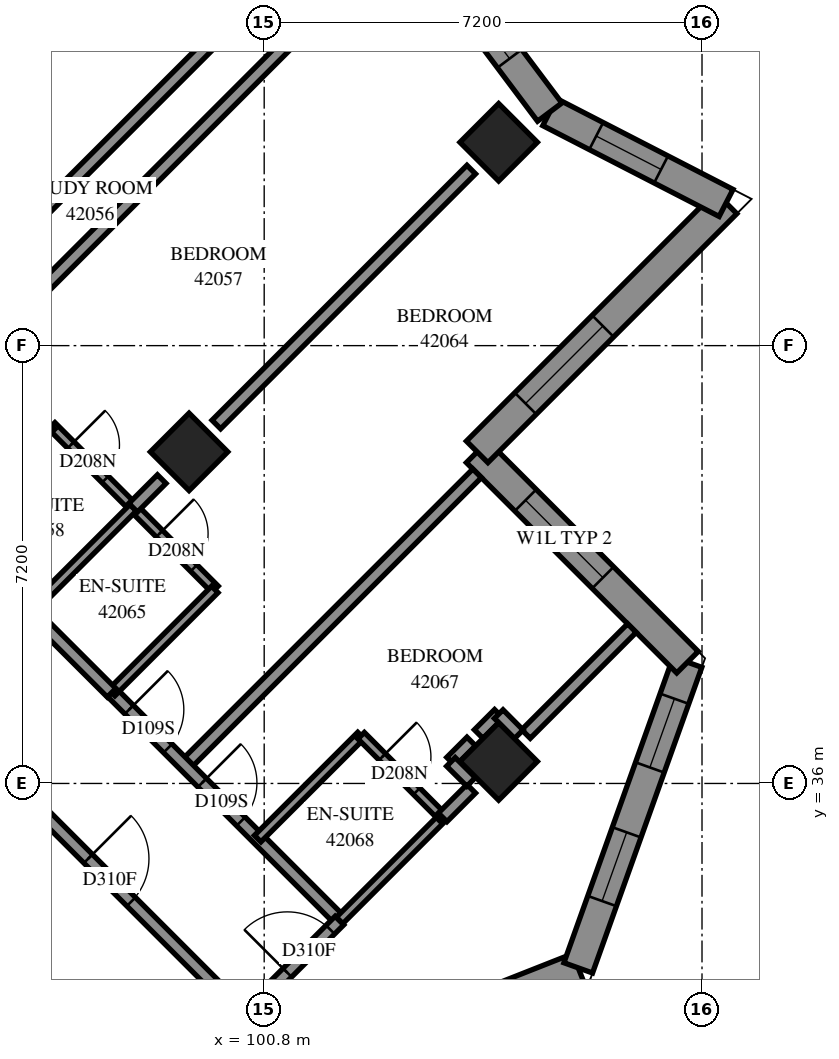
"""IFC4 building model, lengths in metres.
Left out: names, types, materials, properties, quantities, classifications, styles, units other than length and angle.
Written with IfcOpenShell. Run it as: python <this file> out.ifc"""

import sys

from ifc_helpers import new_model, si_unit, direction, frame, frame_2d, origin, origin_2d, place, context, subcontext, project, spatial, polyline, rectangle, outline, extrude, element, fill, save


model = new_model("IFC4")
c1 = context("Model", 3, precision=1e-05, world=origin(), true_north=direction((0.0, 1.0)))
c2 = subcontext(c1, "Body", "Model", "MODEL_VIEW")
j1 = project(units=[si_unit("LENGTHUNIT", "METRE"), si_unit("PLANEANGLEUNIT", "RADIAN")], contexts=[c1])
p1 = place(None, origin())
s1 = spatial("IfcSite", under=j1, at=p1, CompositionType="ELEMENT")
p2 = place(p1, origin())
s2 = spatial("IfcBuilding", under=s1, at=p2, CompositionType="ELEMENT")
p3 = place(p2, frame((0.0, 0.0, 155.8)))
s3 = spatial("IfcBuildingStorey", under=s2, at=p3, CompositionType="ELEMENT", Elevation=155.8)
for number, where, z_axis, x_axis in (
    (1, (104.656, 46.544, 0.0), (0.0, 0.0, 1.0), (0.707, -0.707, 0.0)),
    (2, (99.565, 41.453, 0.0), (0.0, 0.0, 1.0), (0.707, -0.707, 0.0)),
    (3, (104.656, 36.362, 0.0), (0.0, 0.0, 1.0), (0.707, -0.707, 0.0)),
):
    element("IfcColumn", number, at=place(p3, frame(where, z_axis=z_axis, x_axis=x_axis)), inside=s3, PredefinedType="COLUMN", context=c2, shape_type="SweptSolid", body=[
        extrude(rectangle(XDim=0.9, YDim=0.9, at=origin_2d()), origin(), (0.0, 0.0, 1.0), 3.1),
    ])
p4 = place(p3, frame((87.049, 38.695, -0.3), z_axis=(0.0, 0.0, 1.0), x_axis=(0.7071067812, 0.7071067812, 0.0)))
e4 = element("IfcWall", 4, at=p4, inside=s3, PredefinedType="SHEAR", context=c2, shape_type="SweptSolid", body=[
    extrude(rectangle(XDim=14.4, YDim=0.6, at=frame_2d((7.2, 0.0))), origin(), (0.0, 0.0, 1.0), 2.7),
])
p5 = place(p4, frame((4.55, 0.0, 0.3)))
e5 = element("IfcOpeningElement", 5, at=p5, cuts=e4, PredefinedType="OPENING", context=c2, shape_type="SweptSolid", body=[
    extrude(rectangle(XDim=1.1, YDim=2.1, at=frame_2d((0.55, 1.05))), frame((0.0, 0.31, 0.0), z_axis=(0.0, -1.0, 0.0), x_axis=(1.0, 0.0, 0.0)), (0.0, 0.0, 1.0), 0.62),
])
p6 = place(p4, frame((11.35, 0.0, 0.3)))
e6 = element("IfcOpeningElement", 6, at=p6, cuts=e4, PredefinedType="OPENING", context=c2, shape_type="SweptSolid", body=[
    extrude(rectangle(XDim=1.1, YDim=2.1, at=frame_2d((0.55, 1.05))), frame((0.0, 0.31, 0.0), z_axis=(0.0, -1.0, 0.0), x_axis=(1.0, 0.0, 0.0)), (0.0, 0.0, 1.0), 0.62),
])
p7 = place(p3, frame((100.828, 30.939, 0.0), z_axis=(0.0, 0.0, 1.0), x_axis=(0.930134551, 0.3672188953, 0.0)))
e7 = element("IfcWall", 7, at=p7, inside=s3, PredefinedType="SOLIDWALL", context=c2, shape_type="SweptSolid", body=[
    extrude(outline(polyline([(0.108, -0.25), (5.636, -0.25), (5.409, 0.25), (-0.108, 0.25), (0.108, -0.25)])), origin(), (0.0, 0.0, 1.0), 3.1),
])
p8 = place(p7, frame((0.62, 0.0, 0.45)))
e8 = element("IfcOpeningElement", 8, at=p8, cuts=e7, PredefinedType="OPENING", context=c2, shape_type="SweptSolid", body=[
    extrude(rectangle(XDim=2.8, YDim=2.5, at=frame_2d((1.4, 1.25))), frame((0.0, 0.26, 0.0), z_axis=(0.0, -1.0, 0.0), x_axis=(1.0, 0.0, 0.0)), (0.0, 0.0, 1.0), 0.52),
])
p9 = place(p3, frame((105.964, 32.967, 0.0), z_axis=(0.0, 0.0, 1.0), x_axis=(0.3366105096, 0.9416439693, 0.0)))
e9 = element("IfcWall", 9, at=p9, inside=s3, PredefinedType="SOLIDWALL", context=c2, shape_type="SweptSolid", body=[
    extrude(outline(polyline([(-0.113, -0.25), (5.497, -0.25), (5.18, 0.25), (0.113, 0.25), (-0.113, -0.25)])), origin(), (0.0, 0.0, 1.0), 3.1),
])
p10 = place(p9, frame((1.167, 0.0, 0.45)))
e10 = element("IfcOpeningElement", 10, at=p10, cuts=e9, PredefinedType="OPENING", context=c2, shape_type="SweptSolid", body=[
    extrude(rectangle(XDim=1.2, YDim=2.5, at=frame_2d((0.6, 1.25))), frame((0.0, 0.26, 0.0), z_axis=(0.0, -1.0, 0.0), x_axis=(1.0, 0.0, 0.0)), (0.0, 0.0, 1.0), 0.52),
])
p11 = place(p9, frame((3.5, 0.0, 0.45)))
e11 = element("IfcOpeningElement", 11, at=p11, cuts=e9, PredefinedType="OPENING", context=c2, shape_type="SweptSolid", body=[
    extrude(rectangle(XDim=1.2, YDim=2.5, at=frame_2d((0.6, 1.25))), frame((0.0, 0.26, 0.0), z_axis=(0.0, -1.0, 0.0), x_axis=(1.0, 0.0, 0.0)), (0.0, 0.0, 1.0), 0.52),
])
p12 = place(p3, frame((107.761, 37.994, 0.0), z_axis=(0.0, 0.0, 1.0), x_axis=(-0.7071170022, 0.70709656, 0.0)))
e12 = element("IfcWall", 12, at=p12, inside=s3, PredefinedType="SOLIDWALL", context=c2, shape_type="SweptSolid", body=[
    extrude(outline(polyline([(-0.158, -0.25), (4.642, -0.25), (5.142, 0.25), (0.158, 0.25), (-0.158, -0.25)])), origin(), (0.0, 0.0, 1.0), 3.1),
])
p13 = place(p12, frame((1.967, 0.0, 0.6)))
e13 = element("IfcOpeningElement", 13, at=p13, cuts=e12, PredefinedType="OPENING", context=c2, shape_type="SweptSolid", body=[
    extrude(rectangle(XDim=1.8, YDim=1.9, at=frame_2d((0.9, 0.95))), frame((0.0, 0.26, 0.0), z_axis=(0.0, -1.0, 0.0), x_axis=(1.0, 0.0, 0.0)), (0.0, 0.0, 1.0), 0.52),
])
p14 = place(p3, frame((104.302, 41.453, 0.0), z_axis=(0.0, 0.0, 1.0), x_axis=(0.7071240536, 0.7070895083, 0.0)))
e14 = element("IfcWall", 14, at=p14, inside=s3, PredefinedType="SOLIDWALL", context=c2, shape_type="SweptSolid", body=[
    extrude(outline(polyline([(0.25, -0.25), (6.132, -0.25), (5.447, 0.25), (-0.25, 0.25), (0.25, -0.25)])), origin(), (0.0, 0.0, 1.0), 3.1),
])
p15 = place(p14, frame((1.125, 0.0, 0.6)))
e15 = element("IfcOpeningElement", 15, at=p15, cuts=e14, PredefinedType="OPENING", context=c2, shape_type="SweptSolid", body=[
    extrude(rectangle(XDim=1.8, YDim=1.9, at=frame_2d((0.9, 0.95))), frame((0.0, 0.26, 0.0), z_axis=(0.0, -1.0, 0.0), x_axis=(1.0, 0.0, 0.0)), (0.0, 0.0, 1.0), 0.52),
])
p16 = place(p3, frame((108.396, 45.547, 0.0), z_axis=(0.0, 0.0, 1.0), x_axis=(-0.8890618858, 0.4577870282, 0.0)))
e16 = element("IfcWall", 16, at=p16, inside=s3, PredefinedType="SOLIDWALL", context=c2, shape_type="SweptSolid", body=[
    extrude(outline(polyline([(-0.343, -0.25), (3.205, -0.25), (3.32, 0.25), (0.343, 0.25), (-0.343, -0.25)])), origin(), (0.0, 0.0, 1.0), 3.1),
])
p17 = place(p16, frame((1.203, 0.0, 0.45)))
e17 = element("IfcOpeningElement", 17, at=p17, cuts=e16, PredefinedType="OPENING", context=c2, shape_type="SweptSolid", body=[
    extrude(rectangle(XDim=1.2, YDim=2.5, at=frame_2d((0.6, 1.25))), frame((0.0, 0.26, 0.0), z_axis=(0.0, -1.0, 0.0), x_axis=(1.0, 0.0, 0.0)), (0.0, 0.0, 1.0), 0.52),
])
p18 = place(p3, frame((105.495, 47.04, 0.0), z_axis=(0.0, 0.0, 1.0), x_axis=(-0.600158369, 0.7998811987, 0.0)))
e18 = element("IfcWall", 18, at=p18, inside=s3, PredefinedType="SOLIDWALL", context=c2, shape_type="SweptSolid", body=[
    extrude(outline(polyline([(0.057, -0.25), (3.47, -0.25), (3.399, 0.25), (-0.057, 0.25), (0.057, -0.25)])), origin(), (0.0, 0.0, 1.0), 3.1),
])
p19 = place(p18, frame((1.099, 0.0, 0.45)))
e19 = element("IfcOpeningElement", 19, at=p19, cuts=e18, PredefinedType="OPENING", context=c2, shape_type="SweptSolid", body=[
    extrude(rectangle(XDim=1.2, YDim=2.5, at=frame_2d((0.6, 1.25))), frame((0.0, 0.26, 0.0), z_axis=(0.0, -1.0, 0.0), x_axis=(1.0, 0.0, 0.0)), (0.0, 0.0, 1.0), 0.52),
])
p20 = place(p3, frame((94.401, 41.383, 0.0), z_axis=(0.0, 0.0, 1.0), x_axis=(0.7071067812, 0.7071067812, 0.0)))
e20 = element("IfcWall", 20, at=p20, inside=s3, PredefinedType="PARTITIONING", context=c2, shape_type="SweptSolid", body=[
    extrude(rectangle(XDim=12.014, YDim=0.2, at=frame_2d((6.007, 0.0))), origin(), (0.0, 0.0, 1.0), 3.1),
])
p21 = place(p3, frame((92.209, 40.459, 0.0), z_axis=(0.0, 0.0, 1.0), x_axis=(0.7071067812, -0.7071067812, 0.0)))
e21 = element("IfcWall", 21, at=p21, inside=s3, PredefinedType="PARTITIONING", context=c2, shape_type="SweptSolid", body=[
    extrude(rectangle(XDim=11.698, YDim=0.2, at=frame_2d((5.849, 0.0))), origin(), (0.0, 0.0, 1.0), 3.1),
])
p22 = place(p21, frame((3.047, 0.0, 0.0)))
e22 = element("IfcOpeningElement", 22, at=p22, cuts=e21, PredefinedType="OPENING", context=c2, shape_type="SweptSolid", body=[
    extrude(rectangle(XDim=0.9, YDim=2.1, at=frame_2d((0.45, 1.05))), frame((0.0, 0.11, 0.0), z_axis=(0.0, -1.0, 0.0), x_axis=(1.0, 0.0, 0.0)), (0.0, 0.0, 1.0), 0.22),
])
p23 = place(p21, frame((8.056, 0.0, 0.0)))
e23 = element("IfcOpeningElement", 23, at=p23, cuts=e21, PredefinedType="OPENING", context=c2, shape_type="SweptSolid", body=[
    extrude(rectangle(XDim=1.0, YDim=2.1, at=frame_2d((0.5, 1.05))), frame((0.0, 0.11, 0.0), z_axis=(0.0, -1.0, 0.0), x_axis=(1.0, 0.0, 0.0)), (0.0, 0.0, 1.0), 0.22),
])
p24 = place(p3, frame((93.767, 42.021, 0.0), z_axis=(0.0, 0.0, 1.0), x_axis=(0.7071067812, 0.7071067812, 0.0)))
e24 = element("IfcWall", 24, at=p24, inside=s3, PredefinedType="PARTITIONING", context=c2, shape_type="SweptSolid", body=[
    extrude(rectangle(XDim=9.998, YDim=0.2, at=frame_2d((4.999, 0.0))), origin(), (0.0, 0.0, 1.0), 3.1),
])
p25 = place(p24, frame((0.196, 0.0, 0.0)))
e25 = element("IfcOpeningElement", 25, at=p25, cuts=e24, PredefinedType="OPENING", context=c2, shape_type="SweptSolid", body=[
    extrude(rectangle(XDim=1.0, YDim=2.1, at=frame_2d((0.5, 1.05))), frame((0.0, 0.11, 0.0), z_axis=(0.0, -1.0, 0.0), x_axis=(1.0, 0.0, 0.0)), (0.0, 0.0, 1.0), 0.22),
])
p26 = place(p3, frame((99.494, 36.292, 0.0), z_axis=(0.0, 0.0, 1.0), x_axis=(0.7071067812, 0.7071067812, 0.0)))
e26 = element("IfcWall", 26, at=p26, inside=s3, PredefinedType="PARTITIONING", context=c2, shape_type="SweptSolid", body=[
    extrude(rectangle(XDim=6.799, YDim=0.2, at=frame_2d((3.4, 0.0))), origin(), (0.0, 0.0, 1.0), 3.1),
])
p27 = place(p3, frame((100.013, 41.903, 0.0), z_axis=(0.0, 0.0, 1.0), x_axis=(0.7071067812, 0.7071067812, 0.0)))
e27 = element("IfcWall", 27, at=p27, inside=s3, PredefinedType="PARTITIONING", context=c2, shape_type="SweptSolid", body=[
    extrude(rectangle(XDim=5.928, YDim=0.2, at=frame_2d((2.964, 0.0))), origin(), (0.0, 0.0, 1.0), 3.1),
])
p28 = place(p3, frame((98.295, 37.497, 0.0), z_axis=(0.0, 0.0, 1.0), x_axis=(0.7071067812, -0.7071067812, 0.0)))
e28 = element("IfcWall", 28, at=p28, inside=s3, PredefinedType="PARTITIONING", context=c2, shape_type="SweptSolid", body=[
    extrude(rectangle(XDim=5.301, YDim=0.2, at=frame_2d((2.65, 0.0))), origin(), (0.0, 0.0, 1.0), 3.1),
])
p29 = place(p28, frame((0.401, 0.0, 0.0)))
e29 = element("IfcOpeningElement", 29, at=p29, cuts=e28, PredefinedType="OPENING", context=c2, shape_type="SweptSolid", body=[
    extrude(rectangle(XDim=0.9, YDim=2.1, at=frame_2d((0.45, 1.05))), frame((0.0, 0.11, 0.0), z_axis=(0.0, -1.0, 0.0), x_axis=(1.0, 0.0, 0.0)), (0.0, 0.0, 1.0), 0.22),
])
p30 = place(p28, frame((2.1, 0.0, 0.0)))
e30 = element("IfcOpeningElement", 30, at=p30, cuts=e28, PredefinedType="OPENING", context=c2, shape_type="SweptSolid", body=[
    extrude(rectangle(XDim=0.9, YDim=2.1, at=frame_2d((0.45, 1.05))), frame((0.0, 0.11, 0.0), z_axis=(0.0, -1.0, 0.0), x_axis=(1.0, 0.0, 0.0)), (0.0, 0.0, 1.0), 0.22),
])
p31 = place(p3, frame((97.305, 41.881, 0.0), z_axis=(0.0, 0.0, 1.0), x_axis=(0.7067382634, -0.707475107, 0.0)))
e31 = element("IfcWall", 31, at=p31, inside=s3, PredefinedType="PARTITIONING", context=c2, shape_type="SweptSolid", body=[
    extrude(rectangle(XDim=3.8, YDim=0.15, at=frame_2d((1.9, 0.0))), origin(), (0.0, 0.0, 1.0), 3.1),
])
p32 = place(p31, frame((0.445, 0.0, 0.0)))
e32 = element("IfcOpeningElement", 32, at=p32, cuts=e31, PredefinedType="OPENING", context=c2, shape_type="SweptSolid", body=[
    extrude(rectangle(XDim=0.8, YDim=2.1, at=frame_2d((0.4, 1.05))), frame((0.0, 0.085, 0.0), z_axis=(0.0, -1.0, 0.0), x_axis=(1.0, 0.0, 0.0)), (0.0, 0.0, 1.0), 0.17),
])
p33 = place(p31, frame((2.507, 0.0, 0.0)))
e33 = element("IfcOpeningElement", 33, at=p33, cuts=e31, PredefinedType="OPENING", context=c2, shape_type="SweptSolid", body=[
    extrude(rectangle(XDim=0.8, YDim=2.1, at=frame_2d((0.4, 1.05))), frame((0.0, 0.085, 0.0), z_axis=(0.0, -1.0, 0.0), x_axis=(1.0, 0.0, 0.0)), (0.0, 0.0, 1.0), 0.17),
])
p34 = place(p3, frame((105.105, 36.813, 0.0), z_axis=(0.0, 0.0, 1.0), x_axis=(0.7071067812, 0.7071067812, 0.0)))
e34 = element("IfcWall", 34, at=p34, inside=s3, PredefinedType="PARTITIONING", context=c2, shape_type="SweptSolid", body=[
    extrude(rectangle(XDim=2.463, YDim=0.2, at=frame_2d((1.232, 0.0))), origin(), (0.0, 0.0, 1.0), 3.1),
])
for number, where, z_axis, x_axis in (
    (35, (95.603, 40.181, 0.0), (0.0, 0.0, 1.0), (0.707, 0.707, 0.0)),
    (36, (96.947, 38.837, 0.0), (0.0, 0.0, 1.0), (0.707, 0.707, 0.0)),
):
    element("IfcWall", number, at=place(p3, frame(where, z_axis=z_axis, x_axis=x_axis)), inside=s3, PredefinedType="PARTITIONING", context=c2, shape_type="SweptSolid", body=[
        extrude(rectangle(XDim=2.401, YDim=0.15, at=frame_2d((1.201, 0.0))), origin(), (0.0, 0.0, 1.0), 3.1),
    ])
p35 = place(p3, frame((100.693, 35.093, 0.0), z_axis=(0.0, 0.0, 1.0), x_axis=(0.7075233388, 0.706689978, 0.0)))
e37 = element("IfcWall", 37, at=p35, inside=s3, PredefinedType="PARTITIONING", context=c2, shape_type="SweptSolid", body=[
    extrude(rectangle(XDim=2.4, YDim=0.15, at=frame_2d((1.2, 0.0))), origin(), (0.0, 0.0, 1.0), 3.1),
])
p36 = place(p3, frame((98.291, 37.495, 0.0), z_axis=(0.0, 0.0, 1.0), x_axis=(0.7071067812, 0.7071067812, 0.0)))
e38 = element("IfcWall", 38, at=p36, inside=s3, PredefinedType="PARTITIONING", context=c2, shape_type="SweptSolid", body=[
    extrude(rectangle(XDim=2.398, YDim=0.15, at=frame_2d((1.199, 0.0))), origin(), (0.0, 0.0, 1.0), 3.1),
])
p37 = place(p3, frame((102.039, 33.747, 0.0), z_axis=(0.0, 0.0, 1.0), x_axis=(0.7071067812, 0.7071067812, 0.0)))
e39 = element("IfcWall", 39, at=p37, inside=s3, PredefinedType="PARTITIONING", context=c2, shape_type="SweptSolid", body=[
    extrude(rectangle(XDim=2.398, YDim=0.15, at=frame_2d((1.199, 0.0))), origin(), (0.0, 0.0, 1.0), 2.6),
])
p38 = place(p3, frame((100.483, 32.191, 0.0), z_axis=(0.0, 0.0, 1.0), x_axis=(0.7071067812, 0.7071067812, 0.0)))
e40 = element("IfcWall", 40, at=p38, inside=s3, PredefinedType="PARTITIONING", context=c2, shape_type="SweptSolid", body=[
    extrude(rectangle(XDim=2.198, YDim=0.2, at=frame_2d((1.099, 0.0))), origin(), (0.0, 0.0, 1.0), 2.6),
])
p39 = place(p38, frame((0.987, 0.0, 0.0)))
e41 = element("IfcOpeningElement", 41, at=p39, cuts=e40, PredefinedType="OPENING", context=c2, shape_type="SweptSolid", body=[
    extrude(rectangle(XDim=1.0, YDim=2.1, at=frame_2d((0.5, 1.05))), frame((0.0, 0.11, 0.0), z_axis=(0.0, -1.0, 0.0), x_axis=(1.0, 0.0, 0.0)), (0.0, 0.0, 1.0), 0.22),
])
p40 = place(p3, frame((96.946, 38.834, 0.0), z_axis=(0.0, 0.0, 1.0), x_axis=(0.7076330979, -0.7065800724, 0.0)))
e42 = element("IfcWall", 42, at=p40, inside=s3, PredefinedType="PARTITIONING", context=c2, shape_type="SweptSolid", body=[
    extrude(rectangle(XDim=1.899, YDim=0.2, at=frame_2d((0.95, 0.0))), origin(), (0.0, 0.0, 1.0), 3.1),
])
p41 = place(p3, frame((102.394, 36.786, 0.0), z_axis=(0.0, 0.0, 1.0), x_axis=(0.7065800724, -0.7076330979, 0.0)))
e43 = element("IfcWall", 43, at=p41, inside=s3, PredefinedType="PARTITIONING", context=c2, shape_type="SweptSolid", body=[
    extrude(rectangle(XDim=1.899, YDim=0.15, at=frame_2d((0.95, 0.0))), origin(), (0.0, 0.0, 1.0), 3.1),
])
p42 = place(p41, frame((0.492, 0.0, 0.0)))
e44 = element("IfcOpeningElement", 44, at=p42, cuts=e43, PredefinedType="OPENING", context=c2, shape_type="SweptSolid", body=[
    extrude(rectangle(XDim=0.8, YDim=2.1, at=frame_2d((0.4, 1.05))), frame((0.0, 0.085, 0.0), z_axis=(0.0, -1.0, 0.0), x_axis=(1.0, 0.0, 0.0)), (0.0, 0.0, 1.0), 0.17),
])
p43 = place(p3, frame((98.645, 40.535, 0.0), z_axis=(0.0, 0.0, 1.0), x_axis=(0.7071067812, 0.7071067812, 0.0)))
e45 = element("IfcWall", 45, at=p43, inside=s3, PredefinedType="PARTITIONING", context=c2, shape_type="SweptSolid", body=[
    extrude(rectangle(XDim=0.665, YDim=0.2, at=frame_2d((0.332, 0.0))), origin(), (0.0, 0.0, 1.0), 3.1),
])
p44 = place(p3, frame((103.735, 35.443, 0.0), z_axis=(0.0, 0.0, 1.0), x_axis=(0.7071067812, 0.7071067812, 0.0)))
e46 = element("IfcWall", 46, at=p44, inside=s3, PredefinedType="PARTITIONING", context=c2, shape_type="SweptSolid", body=[
    extrude(rectangle(XDim=0.665, YDim=0.2, at=frame_2d((0.332, 0.0))), origin(), (0.0, 0.0, 1.0), 2.6),
])
for number, where, z_axis, x_axis in (
    (47, (103.873, 36.359, 0.0), (0.0, 0.0, 1.0), (0.707, 0.707, 0.0)),
    (48, (104.327, 36.813, 0.0), (0.0, 0.0, 1.0), (0.707, 0.707, 0.0)),
):
    element("IfcWall", number, at=place(p3, frame(where, z_axis=z_axis, x_axis=x_axis)), inside=s3, PredefinedType="PARTITIONING", context=c2, shape_type="SweptSolid", body=[
        extrude(rectangle(XDim=0.469, YDim=0.2, at=frame_2d((0.235, 0.0))), origin(), (0.0, 0.0, 1.0), 3.1),
    ])
for number, where, z_axis, x_axis in (
    (49, (103.871, 36.355, 0.0), (0.0, 0.0, 1.0), (0.709, -0.705, 0.0)),
    (50, (104.657, 37.141, 0.0), (0.0, 0.0, 1.0), (0.705, -0.709, 0.0)),
):
    element("IfcWall", number, at=place(p3, frame(where, z_axis=z_axis, x_axis=x_axis)), inside=s3, PredefinedType="PARTITIONING", context=c2, shape_type="SweptSolid", body=[
        extrude(rectangle(XDim=0.468, YDim=0.2, at=frame_2d((0.234, 0.0))), origin(), (0.0, 0.0, 1.0), 3.1),
    ])
p45 = place(p10, origin())
e51 = element("IfcWindow", 51, at=p45, inside=s3, PartitioningType="SINGLE_PANEL", PredefinedType="WINDOW", context=c2, shape_type="SweptSolid", body=[
    extrude(rectangle(XDim=1.2, YDim=2.5, at=frame_2d((0.6, 1.25))), frame((0.0, 0.18, 0.0), z_axis=(0.0, -1.0, 0.0), x_axis=(1.0, 0.0, 0.0)), (0.0, 0.0, 1.0), 0.06),
])
fill(e10, e51)
p46 = place(p11, origin())
e52 = element("IfcWindow", 52, at=p46, inside=s3, PartitioningType="SINGLE_PANEL", PredefinedType="WINDOW", context=c2, shape_type="SweptSolid", body=[
    extrude(rectangle(XDim=1.2, YDim=2.5, at=frame_2d((0.6, 1.25))), frame((0.0, 0.18, 0.0), z_axis=(0.0, -1.0, 0.0), x_axis=(1.0, 0.0, 0.0)), (0.0, 0.0, 1.0), 0.06),
])
fill(e11, e52)
p47 = place(p13, origin())
e53 = element("IfcWindow", 53, at=p47, inside=s3, PartitioningType="SINGLE_PANEL", PredefinedType="WINDOW", context=c2, shape_type="SweptSolid", body=[
    extrude(rectangle(XDim=1.8, YDim=1.9, at=frame_2d((0.9, 0.95))), frame((0.0, 0.18, 0.0), z_axis=(0.0, -1.0, 0.0), x_axis=(1.0, 0.0, 0.0)), (0.0, 0.0, 1.0), 0.06),
])
fill(e13, e53)
p48 = place(p15, origin())
e54 = element("IfcWindow", 54, at=p48, inside=s3, PartitioningType="SINGLE_PANEL", PredefinedType="WINDOW", context=c2, shape_type="SweptSolid", body=[
    extrude(rectangle(XDim=1.8, YDim=1.9, at=frame_2d((0.9, 0.95))), frame((0.0, 0.18, 0.0), z_axis=(0.0, -1.0, 0.0), x_axis=(1.0, 0.0, 0.0)), (0.0, 0.0, 1.0), 0.06),
])
fill(e15, e54)
p49 = place(p17, origin())
e55 = element("IfcWindow", 55, at=p49, inside=s3, PartitioningType="SINGLE_PANEL", PredefinedType="WINDOW", context=c2, shape_type="SweptSolid", body=[
    extrude(rectangle(XDim=1.2, YDim=2.5, at=frame_2d((0.6, 1.25))), frame((0.0, 0.18, 0.0), z_axis=(0.0, -1.0, 0.0), x_axis=(1.0, 0.0, 0.0)), (0.0, 0.0, 1.0), 0.06),
])
fill(e17, e55)
p50 = place(p19, origin())
e56 = element("IfcWindow", 56, at=p50, inside=s3, PartitioningType="SINGLE_PANEL", PredefinedType="WINDOW", context=c2, shape_type="SweptSolid", body=[
    extrude(rectangle(XDim=1.2, YDim=2.5, at=frame_2d((0.6, 1.25))), frame((0.0, 0.18, 0.0), z_axis=(0.0, -1.0, 0.0), x_axis=(1.0, 0.0, 0.0)), (0.0, 0.0, 1.0), 0.06),
])
fill(e19, e56)
p51 = place(p32, origin())
e57 = element("IfcDoor", 57, at=p51, inside=s3, OperationType="SINGLE_SWING_RIGHT", PredefinedType="DOOR", context=c2, shape_type="SweptSolid", body=[
    extrude(rectangle(XDim=0.8, YDim=2.1, at=frame_2d((0.4, 1.05))), frame((0.0, 0.025, 0.0), z_axis=(0.0, -1.0, 0.0), x_axis=(1.0, 0.0, 0.0)), (0.0, 0.0, 1.0), 0.05),
])
fill(e32, e57)
p52 = place(p29, origin())
e58 = element("IfcDoor", 58, at=p52, inside=s3, OperationType="SINGLE_SWING_LEFT", PredefinedType="DOOR", context=c2, shape_type="SweptSolid", body=[
    extrude(rectangle(XDim=0.9, YDim=2.1, at=frame_2d((0.45, 1.05))), frame((0.0, 0.025, 0.0), z_axis=(0.0, -1.0, 0.0), x_axis=(1.0, 0.0, 0.0)), (0.0, 0.0, 1.0), 0.05),
])
fill(e29, e58)
p53 = place(p33, origin())
e59 = element("IfcDoor", 59, at=p53, inside=s3, OperationType="SINGLE_SWING_RIGHT", PredefinedType="DOOR", context=c2, shape_type="SweptSolid", body=[
    extrude(rectangle(XDim=0.8, YDim=2.1, at=frame_2d((0.4, 1.05))), frame((0.0, 0.025, 0.0), z_axis=(0.0, -1.0, 0.0), x_axis=(1.0, 0.0, 0.0)), (0.0, 0.0, 1.0), 0.05),
])
fill(e33, e59)
p54 = place(p23, origin())
e60 = element("IfcDoor", 60, at=p54, inside=s3, OperationType="SINGLE_SWING_RIGHT", PredefinedType="DOOR", context=c2, shape_type="SweptSolid", body=[
    extrude(rectangle(XDim=1.0, YDim=2.1, at=frame_2d((0.5, 1.05))), frame((0.0, 0.025, 0.0), z_axis=(0.0, -1.0, 0.0), x_axis=(1.0, 0.0, 0.0)), (0.0, 0.0, 1.0), 0.05),
])
fill(e23, e60)
p55 = place(p30, origin())
e61 = element("IfcDoor", 61, at=p55, inside=s3, OperationType="SINGLE_SWING_RIGHT", PredefinedType="DOOR", context=c2, shape_type="SweptSolid", body=[
    extrude(rectangle(XDim=0.9, YDim=2.1, at=frame_2d((0.45, 1.05))), frame((0.0, 0.025, 0.0), z_axis=(0.0, -1.0, 0.0), x_axis=(1.0, 0.0, 0.0)), (0.0, 0.0, 1.0), 0.05),
])
fill(e30, e61)
p56 = place(p42, origin())
e62 = element("IfcDoor", 62, at=p56, inside=s3, OperationType="SINGLE_SWING_RIGHT", PredefinedType="DOOR", context=c2, shape_type="SweptSolid", body=[
    extrude(rectangle(XDim=0.8, YDim=2.1, at=frame_2d((0.4, 1.05))), frame((0.0, 0.025, 0.0), z_axis=(0.0, -1.0, 0.0), x_axis=(1.0, 0.0, 0.0)), (0.0, 0.0, 1.0), 0.05),
])
fill(e44, e62)
p57 = place(p39, origin())
e63 = element("IfcDoor", 63, at=p57, inside=s3, OperationType="SINGLE_SWING_RIGHT", PredefinedType="DOOR", context=c2, shape_type="SweptSolid", body=[
    extrude(rectangle(XDim=1.0, YDim=2.1, at=frame_2d((0.5, 1.05))), frame((0.0, 0.025, 0.0), z_axis=(0.0, -1.0, 0.0), x_axis=(1.0, 0.0, 0.0)), (0.0, 0.0, 1.0), 0.05),
])
fill(e41, e63)
save(model, sys.argv[1])
